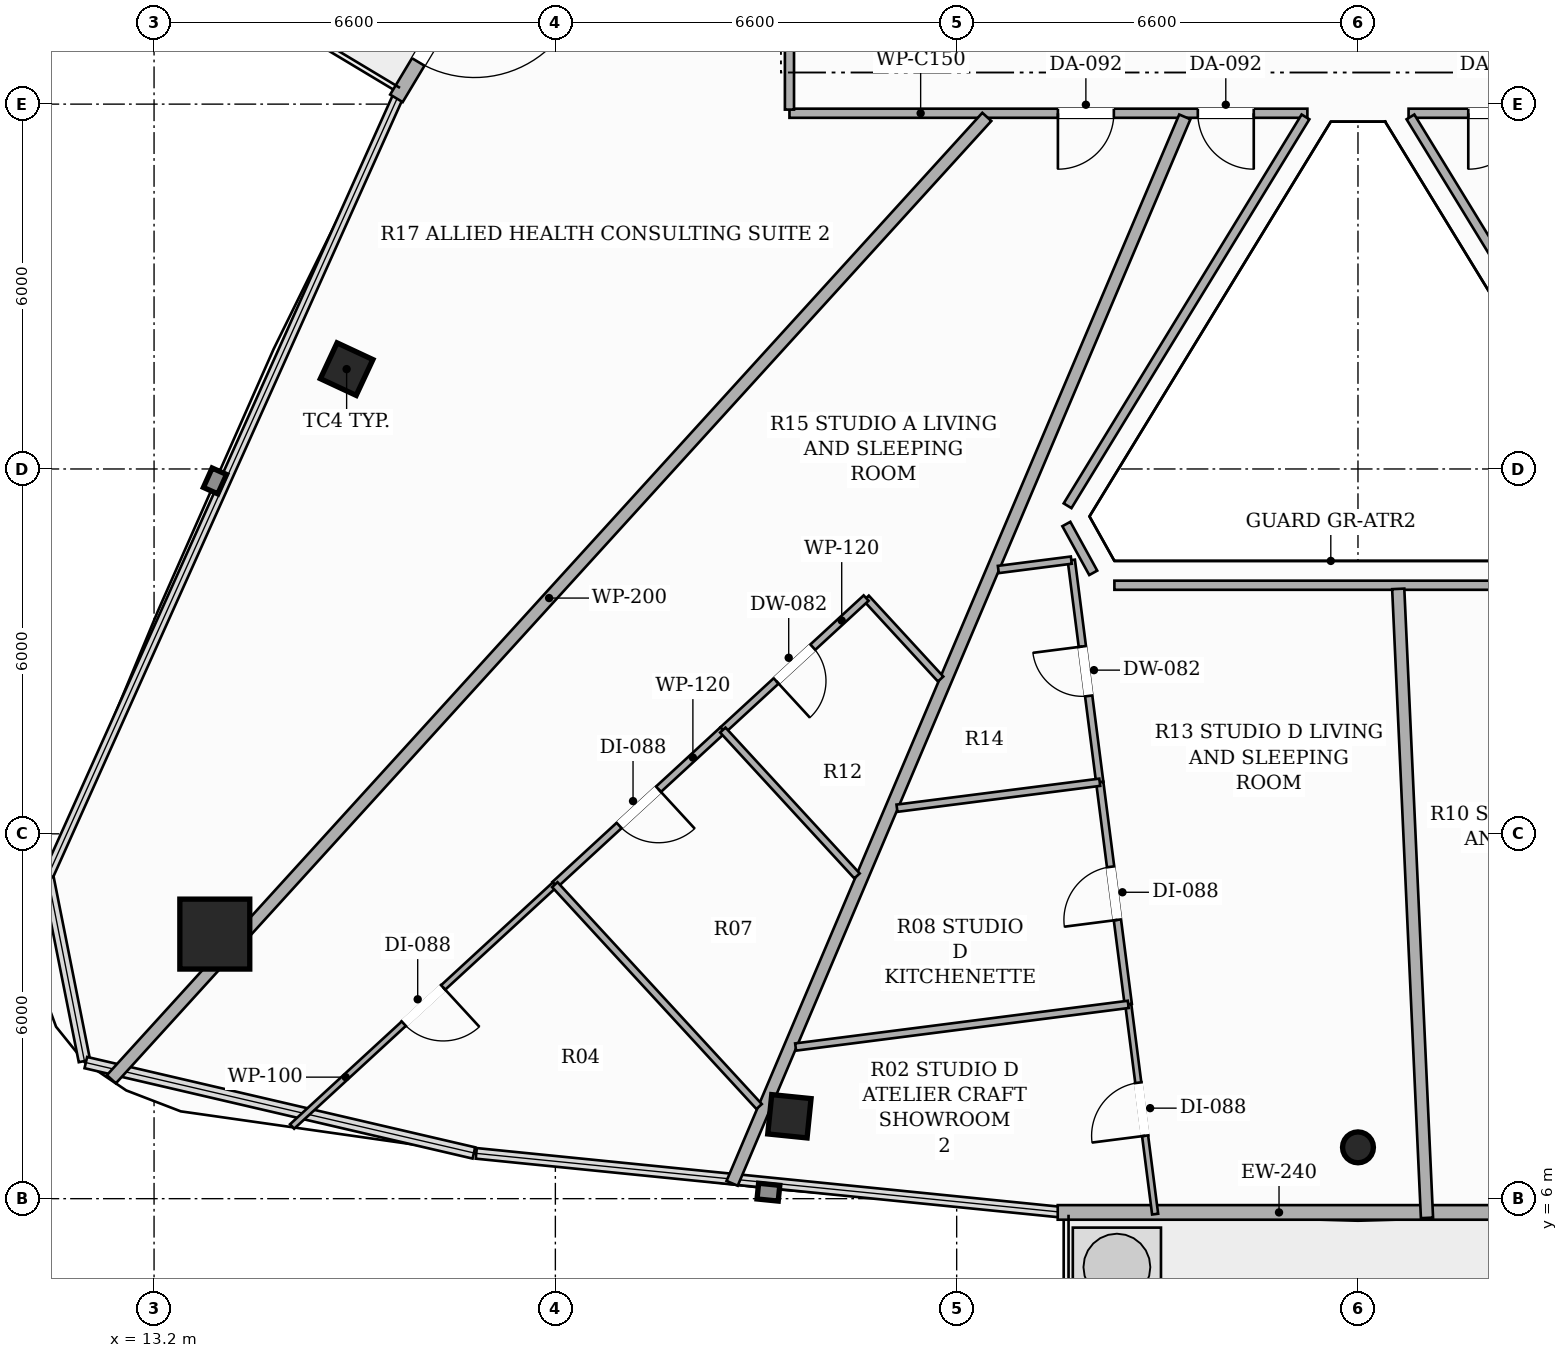
"""IFC4 building model, lengths in metres.
Left out: names, types, materials, properties, quantities, classifications, styles, units other than length and angle.
Written with IfcOpenShell. Run it as: python <this file> out.ifc"""

import sys

from ifc_helpers import new_model, si_unit, direction, frame, frame_2d, origin, origin_2d, place, context, subcontext, project, spatial, rectangle, hollow_rectangle, hollow_circle, extrude, element, fill, save


model = new_model("IFC4")
c1 = context("Model", 3, precision=1e-05, world=origin(), true_north=direction((0.0, 1.0)))
c2 = subcontext(c1, "Body", "Model", "MODEL_VIEW")
j1 = project(units=[si_unit("LENGTHUNIT", "METRE"), si_unit("PLANEANGLEUNIT", "RADIAN")], contexts=[c1])
p1 = place(None, origin())
s1 = spatial("IfcSite", under=j1, at=p1, CompositionType="ELEMENT")
p2 = place(p1, origin())
s2 = spatial("IfcBuilding", under=s1, at=p2, CompositionType="ELEMENT")
p3 = place(p2, frame((0.0, 0.0, 273.35)))
s3 = spatial("IfcBuildingStorey", under=s2, at=p3, CompositionType="ELEMENT", Elevation=273.35)
p4 = place(p3, frame((14.199, 10.351, 0.0), z_axis=(0.0, 0.0, 1.0), x_axis=(1.0, 0.0, 0.0)))
e1 = element("IfcColumn", 1, at=p4, inside=s3, PredefinedType="COLUMN", context=c2, shape_type="SweptSolid", body=[
    extrude(hollow_rectangle(XDim=1.15, YDim=1.15, WallThickness=0.036, at=origin_2d()), origin(), (0.0, 0.0, 1.0), 3.3),
])
for number, where, z_axis, x_axis in (
    (2, (16.367, 19.642, 0.0), (0.0, 0.0, 1.0), (0.423, 0.906, 0.0)),
    (3, (23.649, 7.355, 0.0), (0.0, 0.0, 1.0), (-0.995, 0.101, 0.0)),
):
    element("IfcColumn", number, at=place(p3, frame(where, z_axis=z_axis, x_axis=x_axis)), inside=s3, PredefinedType="COLUMN", context=c2, shape_type="SweptSolid", body=[
        extrude(hollow_rectangle(XDim=0.65, YDim=0.65, WallThickness=0.022, at=origin_2d()), origin(), (0.0, 0.0, 1.0), 3.3),
    ])
p5 = place(p3, frame((33.0, 6.844, 0.0), z_axis=(0.0, 0.0, 1.0), x_axis=(1.0, 0.0, 0.0)))
e4 = element("IfcColumn", 4, at=p5, inside=s3, PredefinedType="COLUMN", context=c2, shape_type="SweptSolid", body=[
    extrude(hollow_circle(Radius=0.254, WallThickness=0.016, at=origin_2d()), origin(), (0.0, 0.0, 1.0), 3.3),
])
p6 = place(p3, frame((22.094, 32.279, 0.0), z_axis=(0.0, 0.0, 1.0), x_axis=(-0.514303866757, -0.857608029719, 0.0)))
e5 = element("IfcWall", 5, at=p6, inside=s3, PredefinedType="SOLIDWALL", context=c2, shape_type="SweptSolid", body=[
    extrude(rectangle(XDim=9.543, YDim=0.24, at=frame_2d((4.771, 0.0))), origin(), (0.0, 0.0, 1.0), 2.584),
])
p7 = place(p6, frame((7.045, 0.0, 0.0)))
e6 = element("IfcOpeningElement", 6, at=p7, cuts=e5, PredefinedType="OPENING", context=c2, shape_type="SweptSolid", body=[
    extrude(rectangle(XDim=1.8, YDim=2.2, at=frame_2d((0.9, 1.1))), frame((0.0, 0.13, 0.0), z_axis=(0.0, -1.0, 0.0), x_axis=(1.0, 0.0, 0.0)), (0.0, 0.0, 1.0), 0.26),
])
p8 = place(p3, frame((28.062, 5.774, 0.0), z_axis=(0.0, 0.0, 1.0), x_axis=(1.0, 0.0, 0.0)))
e7 = element("IfcWall", 7, at=p8, inside=s3, PredefinedType="SOLIDWALL", context=c2, shape_type="SweptSolid", body=[
    extrude(rectangle(XDim=9.876, YDim=0.24, at=frame_2d((4.938, 0.0))), origin(), (0.0, 0.0, 1.0), 2.584),
])
p9 = place(p8, frame((7.379, 0.0, 0.0)))
e8 = element("IfcOpeningElement", 8, at=p9, cuts=e7, PredefinedType="OPENING", context=c2, shape_type="SweptSolid", body=[
    extrude(rectangle(XDim=1.8, YDim=2.2, at=frame_2d((0.9, 1.1))), frame((0.0, 0.13, 0.0), z_axis=(0.0, -1.0, 0.0), x_axis=(1.0, 0.0, 0.0)), (0.0, 0.0, 1.0), 0.26),
])
p10 = place(p3, frame((32.168, 23.85, 0.0), z_axis=(0.0, 0.0, 1.0), x_axis=(-1.0, 0.0, 0.0)))
e9 = element("IfcWall", 9, at=p10, inside=s3, PredefinedType="PARTITIONING", context=c2, shape_type="SweptSolid", body=[
    extrude(rectangle(XDim=8.518, YDim=0.15, at=frame_2d((4.259, 0.0))), origin(), (0.0, 0.0, 1.0), 2.525),
])
p11 = place(p10, frame((3.183, 0.0, 0.0)))
e10 = element("IfcOpeningElement", 10, at=p11, cuts=e9, PredefinedType="OPENING", context=c2, shape_type="SweptSolid", body=[
    extrude(rectangle(XDim=0.92, YDim=2.15, at=frame_2d((0.46, 1.075))), frame((0.0, 0.085, 0.0), z_axis=(0.0, -1.0, 0.0), x_axis=(1.0, 0.0, 0.0)), (0.0, 0.0, 1.0), 0.17),
])
p12 = place(p10, frame((0.882, 0.0, 0.0)))
e11 = element("IfcOpeningElement", 11, at=p12, cuts=e9, PredefinedType="OPENING", context=c2, shape_type="SweptSolid", body=[
    extrude(rectangle(XDim=0.92, YDim=2.15, at=frame_2d((0.46, 1.075))), frame((0.0, 0.085, 0.0), z_axis=(0.0, -1.0, 0.0), x_axis=(1.0, 0.0, 0.0)), (0.0, 0.0, 1.0), 0.17),
])
p13 = place(p3, frame((23.65, 23.91, 0.0), z_axis=(0.0, 0.0, 1.0), x_axis=(0.0, 1.0, 0.0)))
e12 = element("IfcWall", 12, at=p13, inside=s3, PredefinedType="PARTITIONING", context=c2, shape_type="SweptSolid", body=[
    extrude(rectangle(XDim=10.509, YDim=0.15, at=frame_2d((5.254, 0.0))), origin(), (0.0, 0.0, 1.0), 2.452),
])
p14 = place(p13, frame((4.814, 0.0, 0.0)))
e13 = element("IfcOpeningElement", 13, at=p14, cuts=e12, PredefinedType="OPENING", context=c2, shape_type="SweptSolid", body=[
    extrude(rectangle(XDim=0.88, YDim=2.1, at=frame_2d((0.44, 1.05))), frame((0.0, 0.085, 0.0), z_axis=(0.0, -1.0, 0.0), x_axis=(1.0, 0.0, 0.0)), (0.0, 0.0, 1.0), 0.17),
])
p15 = place(p3, frame((42.19, 23.85, 0.0), z_axis=(0.0, 0.0, 1.0), x_axis=(-1.0, 0.0, 0.0)))
e14 = element("IfcWall", 14, at=p15, inside=s3, PredefinedType="PARTITIONING", context=c2, shape_type="SweptSolid", body=[
    extrude(rectangle(XDim=8.358, YDim=0.15, at=frame_2d((4.179, 0.0))), origin(), (0.0, 0.0, 1.0), 2.525),
])
p16 = place(p15, frame((0.52, 0.0, 0.0)))
e15 = element("IfcOpeningElement", 15, at=p16, cuts=e14, PredefinedType="OPENING", context=c2, shape_type="SweptSolid", body=[
    extrude(rectangle(XDim=0.88, YDim=2.1, at=frame_2d((0.44, 1.05))), frame((0.0, 0.085, 0.0), z_axis=(0.0, -1.0, 0.0), x_axis=(1.0, 0.0, 0.0)), (0.0, 0.0, 1.0), 0.17),
])
p17 = place(p15, frame((3.757, 0.0, 0.0)))
e16 = element("IfcOpeningElement", 16, at=p17, cuts=e14, PredefinedType="OPENING", context=c2, shape_type="SweptSolid", body=[
    extrude(rectangle(XDim=0.92, YDim=2.15, at=frame_2d((0.46, 1.075))), frame((0.0, 0.085, 0.0), z_axis=(0.0, -1.0, 0.0), x_axis=(1.0, 0.0, 0.0)), (0.0, 0.0, 1.0), 0.17),
])
p18 = place(p15, frame((6.456, 0.0, 0.0)))
e17 = element("IfcOpeningElement", 17, at=p18, cuts=e14, PredefinedType="OPENING", context=c2, shape_type="SweptSolid", body=[
    extrude(rectangle(XDim=0.92, YDim=2.15, at=frame_2d((0.46, 1.075))), frame((0.0, 0.085, 0.0), z_axis=(0.0, -1.0, 0.0), x_axis=(1.0, 0.0, 0.0)), (0.0, 0.0, 1.0), 0.17),
])
p19 = place(p3, frame((33.863, 23.79, 0.0), z_axis=(0.0, 0.0, 1.0), x_axis=(0.521913594497, -0.852998358661, 0.0)))
e18 = element("IfcWall", 18, at=p19, inside=s3, PredefinedType="PARTITIONING", context=c2, shape_type="SweptSolid", body=[
    extrude(rectangle(XDim=7.497, YDim=0.15, at=frame_2d((3.749, 0.0))), origin(), (0.0, 0.0, 1.0), 2.733),
])
p20 = place(p3, frame((37.006, 16.088, 0.0), z_axis=(0.0, 0.0, 1.0), x_axis=(-1.0, 0.0, 0.0)))
e19 = element("IfcWall", 19, at=p20, inside=s3, PredefinedType="PARTITIONING", context=c2, shape_type="SweptSolid", body=[
    extrude(rectangle(XDim=8.012, YDim=0.15, at=frame_2d((4.006, 0.0))), origin(), (0.0, 0.0, 1.0), 2.733),
])
p21 = place(p3, frame((28.646, 16.292, 0.0), z_axis=(0.0, 0.0, 1.0), x_axis=(-0.482133469033, 0.876097778811, 0.0)))
e20 = element("IfcWall", 20, at=p21, inside=s3, PredefinedType="PARTITIONING", context=c2, shape_type="SweptSolid", body=[
    extrude(rectangle(XDim=0.917, YDim=0.15, at=frame_2d((0.458, 0.0))), origin(), (0.0, 0.0, 1.0), 3.02),
])
p22 = place(p3, frame((28.224, 17.395, 0.0), z_axis=(0.0, 0.0, 1.0), x_axis=(0.521913594497, 0.852998358661, 0.0)))
e21 = element("IfcWall", 21, at=p22, inside=s3, PredefinedType="PARTITIONING", context=c2, shape_type="SweptSolid", body=[
    extrude(rectangle(XDim=7.497, YDim=0.15, at=frame_2d((3.749, 0.0))), origin(), (0.0, 0.0, 1.0), 2.733),
])
p23 = place(p3, frame((26.896, 23.79, 0.0), z_axis=(0.0, 0.0, 1.0), x_axis=(-0.672947642337, -0.739690118004, 0.0)))
e22 = element("IfcWall", 22, at=p23, inside=s3, PredefinedType="PARTITIONING", context=c2, shape_type="SweptSolid", body=[
    extrude(rectangle(XDim=21.395, YDim=0.2, at=frame_2d((10.698, 0.0))), origin(), (0.0, 0.0, 1.0), 2.452),
])
p24 = place(p3, frame((30.152, 23.79, 0.0), z_axis=(0.0, 0.0, 1.0), x_axis=(-0.390757480658, -0.920493667175, 0.0)))
e23 = element("IfcWall", 23, at=p24, inside=s3, PredefinedType="PARTITIONING", context=c2, shape_type="SweptSolid", body=[
    extrude(rectangle(XDim=19.053, YDim=0.2, at=frame_2d((9.526, 0.0))), origin(), (0.0, 0.0, 1.0), 2.452),
])
p25 = place(p3, frame((34.135, 5.684, 0.0), z_axis=(0.0, 0.0, 1.0), x_axis=(-0.045669685987, 0.998956595545, 0.0)))
e24 = element("IfcWall", 24, at=p25, inside=s3, PredefinedType="PARTITIONING", context=c2, shape_type="SweptSolid", body=[
    extrude(rectangle(XDim=10.355, YDim=0.2, at=frame_2d((5.177, 0.0))), origin(), (0.0, 0.0, 1.0), 2.452),
])
p26 = place(p3, frame((26.136, 14.546, 0.0), z_axis=(0.0, 0.0, 1.0), x_axis=(-0.67721439392, 0.735785746443, 0.0)))
e25 = element("IfcWall", 25, at=p26, inside=s3, PredefinedType="PARTITIONING", context=c2, shape_type="SweptSolid", body=[
    extrude(rectangle(XDim=1.809, YDim=0.12, at=frame_2d((0.905, 0.0))), origin(), (0.0, 0.0, 1.0), 2.733),
])
p27 = place(p3, frame((24.911, 15.877, 0.0), z_axis=(0.0, 0.0, 1.0), x_axis=(-0.735690989841, -0.677317331438, 0.0)))
e26 = element("IfcWall", 26, at=p27, inside=s3, PredefinedType="PARTITIONING", context=c2, shape_type="SweptSolid", body=[
    extrude(rectangle(XDim=3.204, YDim=0.12, at=frame_2d((1.602, 0.0))), origin(), (0.0, 0.0, 1.0), 3.02),
])
p28 = place(p27, frame((1.192, 0.0, 0.0)))
e27 = element("IfcOpeningElement", 27, at=p28, cuts=e26, PredefinedType="OPENING", context=c2, shape_type="SweptSolid", body=[
    extrude(rectangle(XDim=0.82, YDim=2.1, at=frame_2d((0.41, 1.05))), frame((0.0, 0.07, 0.0), z_axis=(0.0, -1.0, 0.0), x_axis=(1.0, 0.0, 0.0)), (0.0, 0.0, 1.0), 0.14),
])
p29 = place(p3, frame((22.554, 13.707, 0.0), z_axis=(0.0, 0.0, 1.0), x_axis=(-0.735789751444, -0.677210042506, 0.0)))
e28 = element("IfcWall", 28, at=p29, inside=s3, PredefinedType="PARTITIONING", context=c2, shape_type="SweptSolid", body=[
    extrude(rectangle(XDim=3.755, YDim=0.12, at=frame_2d((1.877, 0.0))), origin(), (0.0, 0.0, 1.0), 2.733),
])
p30 = place(p29, frame((1.438, 0.0, 0.0)))
e29 = element("IfcOpeningElement", 29, at=p30, cuts=e28, PredefinedType="OPENING", context=c2, shape_type="SweptSolid", body=[
    extrude(rectangle(XDim=0.88, YDim=2.1, at=frame_2d((0.44, 1.05))), frame((0.0, 0.07, 0.0), z_axis=(0.0, -1.0, 0.0), x_axis=(1.0, 0.0, 0.0)), (0.0, 0.0, 1.0), 0.14),
])
p31 = place(p3, frame((19.791, 11.164, 0.0), z_axis=(0.0, 0.0, 1.0), x_axis=(-0.735787653784, -0.677212321608, 0.0)))
e30 = element("IfcWall", 30, at=p31, inside=s3, PredefinedType="PARTITIONING", context=c2, shape_type="SweptSolid", body=[
    extrude(rectangle(XDim=5.873, YDim=0.1, at=frame_2d((2.936, 0.0))), origin(), (0.0, 0.0, 1.0), 2.452),
])
p32 = place(p31, frame((2.496, 0.0, 0.0)))
e31 = element("IfcOpeningElement", 31, at=p32, cuts=e30, PredefinedType="OPENING", context=c2, shape_type="SweptSolid", body=[
    extrude(rectangle(XDim=0.88, YDim=2.1, at=frame_2d((0.44, 1.05))), frame((0.0, 0.06, 0.0), z_axis=(0.0, -1.0, 0.0), x_axis=(1.0, 0.0, 0.0)), (0.0, 0.0, 1.0), 0.12),
])
p33 = place(p3, frame((24.761, 11.308, 0.0), z_axis=(0.0, 0.0, 1.0), x_axis=(-0.677059775875, 0.735928026299, 0.0)))
e32 = element("IfcWall", 32, at=p33, inside=s3, PredefinedType="PARTITIONING", context=c2, shape_type="SweptSolid", body=[
    extrude(rectangle(XDim=3.26, YDim=0.12, at=frame_2d((1.63, 0.0))), origin(), (0.0, 0.0, 1.0), 2.733),
])
p34 = place(p3, frame((23.151, 7.515, 0.0), z_axis=(0.0, 0.0, 1.0), x_axis=(-0.677343302262, 0.735667078834, 0.0)))
e33 = element("IfcWall", 33, at=p34, inside=s3, PredefinedType="PARTITIONING", context=c2, shape_type="SweptSolid", body=[
    extrude(rectangle(XDim=4.96, YDim=0.12, at=frame_2d((2.48, 0.0))), origin(), (0.0, 0.0, 1.0), 2.452),
])
p35 = place(p3, frame((28.753, 12.848, 0.0), z_axis=(0.0, 0.0, 1.0), x_axis=(-0.127077358501, 0.991892809207, 0.0)))
e34 = element("IfcWall", 34, at=p35, inside=s3, PredefinedType="PARTITIONING", context=c2, shape_type="SweptSolid", body=[
    extrude(rectangle(XDim=3.683, YDim=0.12, at=frame_2d((1.841, 0.0))), origin(), (0.0, 0.0, 1.0), 2.733),
])
p36 = place(p35, frame((1.431, 0.0, 0.0)))
e35 = element("IfcOpeningElement", 35, at=p36, cuts=e34, PredefinedType="OPENING", context=c2, shape_type="SweptSolid", body=[
    extrude(rectangle(XDim=0.82, YDim=2.1, at=frame_2d((0.41, 1.05))), frame((0.0, 0.07, 0.0), z_axis=(0.0, -1.0, 0.0), x_axis=(1.0, 0.0, 0.0)), (0.0, 0.0, 1.0), 0.14),
])
p37 = place(p3, frame((28.285, 16.501, 0.0), z_axis=(0.0, 0.0, 1.0), x_axis=(-0.991859459137, -0.127337399535, 0.0)))
e36 = element("IfcWall", 36, at=p37, inside=s3, PredefinedType="PARTITIONING", context=c2, shape_type="SweptSolid", body=[
    extrude(rectangle(XDim=1.21, YDim=0.12, at=frame_2d((0.605, 0.0))), origin(), (0.0, 0.0, 1.0), 3.02),
])
p38 = place(p3, frame((29.222, 9.195, 0.0), z_axis=(0.0, 0.0, 1.0), x_axis=(-0.127346594916, 0.991858278568, 0.0)))
e37 = element("IfcWall", 37, at=p38, inside=s3, PredefinedType="PARTITIONING", context=c2, shape_type="SweptSolid", body=[
    extrude(rectangle(XDim=3.683, YDim=0.12, at=frame_2d((1.841, 0.0))), origin(), (0.0, 0.0, 1.0), 2.733),
])
p39 = place(p38, frame((1.401, 0.0, 0.0)))
e38 = element("IfcOpeningElement", 38, at=p39, cuts=e37, PredefinedType="OPENING", context=c2, shape_type="SweptSolid", body=[
    extrude(rectangle(XDim=0.88, YDim=2.1, at=frame_2d((0.44, 1.05))), frame((0.0, 0.07, 0.0), z_axis=(0.0, -1.0, 0.0), x_axis=(1.0, 0.0, 0.0)), (0.0, 0.0, 1.0), 0.14),
])
p40 = place(p3, frame((29.664, 5.746, 0.0), z_axis=(0.0, 0.0, 1.0), x_axis=(-0.127153688826, 0.991883027084, 0.0)))
e39 = element("IfcWall", 39, at=p40, inside=s3, PredefinedType="PARTITIONING", context=c2, shape_type="SweptSolid", body=[
    extrude(rectangle(XDim=3.477, YDim=0.1, at=frame_2d((1.739, 0.0))), origin(), (0.0, 0.0, 1.0), 2.452),
])
p41 = place(p40, frame((1.299, 0.0, 0.0)))
e40 = element("IfcOpeningElement", 40, at=p41, cuts=e39, PredefinedType="OPENING", context=c2, shape_type="SweptSolid", body=[
    extrude(rectangle(XDim=0.88, YDim=2.1, at=frame_2d((0.44, 1.05))), frame((0.0, 0.06, 0.0), z_axis=(0.0, -1.0, 0.0), x_axis=(1.0, 0.0, 0.0)), (0.0, 0.0, 1.0), 0.12),
])
p42 = place(p3, frame((28.753, 12.848, 0.0), z_axis=(0.0, 0.0, 1.0), x_axis=(-0.991902552373, -0.127001285805, 0.0)))
e41 = element("IfcWall", 41, at=p42, inside=s3, PredefinedType="PARTITIONING", context=c2, shape_type="SweptSolid", body=[
    extrude(rectangle(XDim=3.362, YDim=0.12, at=frame_2d((1.681, 0.0))), origin(), (0.0, 0.0, 1.0), 2.733),
])
p43 = place(p3, frame((29.222, 9.195, 0.0), z_axis=(0.0, 0.0, 1.0), x_axis=(-0.991886960484, -0.127123001942, 0.0)))
e42 = element("IfcWall", 42, at=p43, inside=s3, PredefinedType="PARTITIONING", context=c2, shape_type="SweptSolid", body=[
    extrude(rectangle(XDim=5.516, YDim=0.12, at=frame_2d((2.758, 0.0))), origin(), (0.0, 0.0, 1.0), 2.733),
])
p44 = place(p7, origin())
e43 = element("IfcDoor", 43, at=p44, inside=s3, OperationType="SINGLE_SWING_LEFT", PredefinedType="DOOR", context=c2, shape_type="SweptSolid", body=[
    extrude(rectangle(XDim=1.8, YDim=2.2, at=frame_2d((0.9, 1.1))), frame((0.0, 0.025, 0.0), z_axis=(0.0, -1.0, 0.0), x_axis=(1.0, 0.0, 0.0)), (0.0, 0.0, 1.0), 0.05),
])
fill(e6, e43)
p45 = place(p11, origin())
e44 = element("IfcDoor", 44, at=p45, inside=s3, OperationType="SINGLE_SWING_RIGHT", PredefinedType="DOOR", context=c2, shape_type="SweptSolid", body=[
    extrude(rectangle(XDim=0.92, YDim=2.15, at=frame_2d((0.46, 1.075))), frame((0.0, 0.025, 0.0), z_axis=(0.0, -1.0, 0.0), x_axis=(1.0, 0.0, 0.0)), (0.0, 0.0, 1.0), 0.05),
])
fill(e10, e44)
p46 = place(p28, origin())
e45 = element("IfcDoor", 45, at=p46, inside=s3, OperationType="SINGLE_SWING_RIGHT", PredefinedType="DOOR", context=c2, shape_type="SweptSolid", body=[
    extrude(rectangle(XDim=0.82, YDim=2.1, at=frame_2d((0.41, 1.05))), frame((0.0, 0.025, 0.0), z_axis=(0.0, -1.0, 0.0), x_axis=(1.0, 0.0, 0.0)), (0.0, 0.0, 1.0), 0.05),
])
fill(e27, e45)
p47 = place(p30, origin())
e46 = element("IfcDoor", 46, at=p47, inside=s3, OperationType="SINGLE_SWING_LEFT", PredefinedType="DOOR", context=c2, shape_type="SweptSolid", body=[
    extrude(rectangle(XDim=0.88, YDim=2.1, at=frame_2d((0.44, 1.05))), frame((0.0, 0.025, 0.0), z_axis=(0.0, -1.0, 0.0), x_axis=(1.0, 0.0, 0.0)), (0.0, 0.0, 1.0), 0.05),
])
fill(e29, e46)
p48 = place(p32, origin())
e47 = element("IfcDoor", 47, at=p48, inside=s3, OperationType="SINGLE_SWING_LEFT", PredefinedType="DOOR", context=c2, shape_type="SweptSolid", body=[
    extrude(rectangle(XDim=0.88, YDim=2.1, at=frame_2d((0.44, 1.05))), frame((0.0, 0.025, 0.0), z_axis=(0.0, -1.0, 0.0), x_axis=(1.0, 0.0, 0.0)), (0.0, 0.0, 1.0), 0.05),
])
fill(e31, e47)
p49 = place(p18, origin())
e48 = element("IfcDoor", 48, at=p49, inside=s3, OperationType="SINGLE_SWING_RIGHT", PredefinedType="DOOR", context=c2, shape_type="SweptSolid", body=[
    extrude(rectangle(XDim=0.92, YDim=2.15, at=frame_2d((0.46, 1.075))), frame((0.0, 0.025, 0.0), z_axis=(0.0, -1.0, 0.0), x_axis=(1.0, 0.0, 0.0)), (0.0, 0.0, 1.0), 0.05),
])
fill(e17, e48)
p50 = place(p12, origin())
e49 = element("IfcDoor", 49, at=p50, inside=s3, OperationType="SINGLE_SWING_LEFT", PredefinedType="DOOR", context=c2, shape_type="SweptSolid", body=[
    extrude(rectangle(XDim=0.92, YDim=2.15, at=frame_2d((0.46, 1.075))), frame((0.0, 0.025, 0.0), z_axis=(0.0, -1.0, 0.0), x_axis=(1.0, 0.0, 0.0)), (0.0, 0.0, 1.0), 0.05),
])
fill(e11, e49)
p51 = place(p36, origin())
e50 = element("IfcDoor", 50, at=p51, inside=s3, OperationType="SINGLE_SWING_RIGHT", PredefinedType="DOOR", context=c2, shape_type="SweptSolid", body=[
    extrude(rectangle(XDim=0.82, YDim=2.1, at=frame_2d((0.41, 1.05))), frame((0.0, 0.025, 0.0), z_axis=(0.0, -1.0, 0.0), x_axis=(1.0, 0.0, 0.0)), (0.0, 0.0, 1.0), 0.05),
])
fill(e35, e50)
p52 = place(p39, origin())
e51 = element("IfcDoor", 51, at=p52, inside=s3, OperationType="SINGLE_SWING_LEFT", PredefinedType="DOOR", context=c2, shape_type="SweptSolid", body=[
    extrude(rectangle(XDim=0.88, YDim=2.1, at=frame_2d((0.44, 1.05))), frame((0.0, 0.025, 0.0), z_axis=(0.0, -1.0, 0.0), x_axis=(1.0, 0.0, 0.0)), (0.0, 0.0, 1.0), 0.05),
])
fill(e38, e51)
p53 = place(p41, origin())
e52 = element("IfcDoor", 52, at=p53, inside=s3, OperationType="SINGLE_SWING_LEFT", PredefinedType="DOOR", context=c2, shape_type="SweptSolid", body=[
    extrude(rectangle(XDim=0.88, YDim=2.1, at=frame_2d((0.44, 1.05))), frame((0.0, 0.025, 0.0), z_axis=(0.0, -1.0, 0.0), x_axis=(1.0, 0.0, 0.0)), (0.0, 0.0, 1.0), 0.05),
])
fill(e40, e52)
save(model, sys.argv[1])
